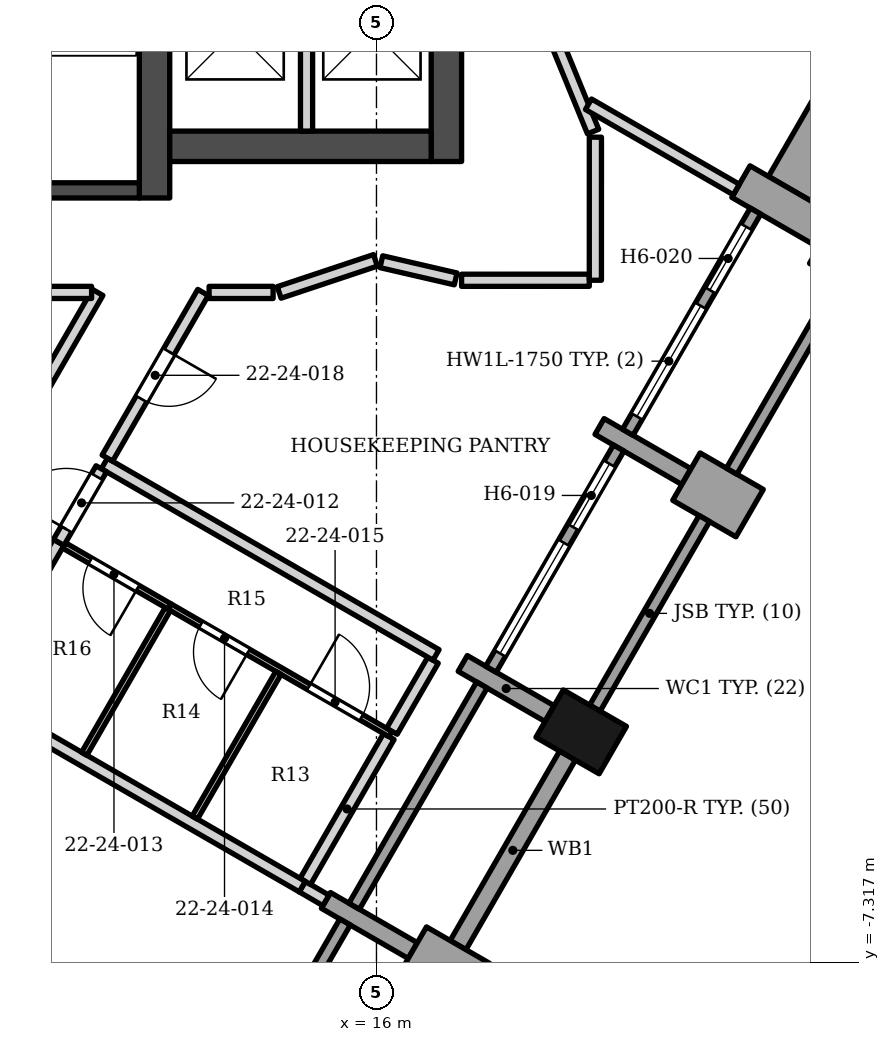
"""IFC4 building model, lengths in metres.
Left out: names, types, materials, properties, quantities, classifications, styles, units other than length and angle.
Written with IfcOpenShell. Run it as: python <this file> out.ifc"""

import sys

from ifc_helpers import new_model, si_unit, direction, frame, frame_2d, origin, origin_2d, place, context, subcontext, project, spatial, polyline, rectangle, outline, extrude, element, fill, save


model = new_model("IFC4")
c1 = context("Model", 3, precision=1e-05, world=origin(), true_north=direction((0.0, 1.0)))
c2 = subcontext(c1, "Body", "Model", "MODEL_VIEW")
j1 = project(units=[si_unit("LENGTHUNIT", "METRE"), si_unit("PLANEANGLEUNIT", "RADIAN")], contexts=[c1])
p1 = place(None, origin())
s1 = spatial("IfcSite", under=j1, at=p1, CompositionType="ELEMENT")
p2 = place(p1, origin())
s2 = spatial("IfcBuilding", under=s1, at=p2, CompositionType="ELEMENT")
p3 = place(p2, frame((0.0, 0.0, 102.0)))
s3 = spatial("IfcBuildingStorey", under=s2, at=p3, CompositionType="ELEMENT", Elevation=102.0)
p4 = place(p3, frame((12.35, 5.253, 0.0), z_axis=(0.0, 0.0, 1.0), x_axis=(0.0, 1.0, 0.0)))
e1 = element("IfcWall", 1, at=p4, inside=s3, PredefinedType="SHEAR", context=c2, shape_type="SweptSolid", body=[
    extrude(rectangle(XDim=13.3, YDim=0.5, at=frame_2d((6.65, 0.0))), origin(), (0.0, 0.0, 1.0), 3.4),
])
p5 = place(p3, frame((8.35, 5.378, 0.0), z_axis=(0.0, 0.0, 1.0), x_axis=(1.0, 0.0, 0.0)))
e2 = element("IfcWall", 2, at=p5, inside=s3, PredefinedType="SHEAR", context=c2, shape_type="SweptSolid", body=[
    extrude(rectangle(XDim=3.75, YDim=0.25, at=frame_2d((1.875, 0.0))), origin(), (0.0, 0.0, 1.0), 3.4),
])
p6 = place(p3, frame((12.6, 6.103, 0.0), z_axis=(0.0, 0.0, 1.0), x_axis=(1.0, 0.0, 0.0)))
e3 = element("IfcWall", 3, at=p6, inside=s3, PredefinedType="SHEAR", context=c2, shape_type="SweptSolid", body=[
    extrude(rectangle(XDim=4.3, YDim=0.5, at=frame_2d((2.15, 0.0))), origin(), (0.0, 0.0, 1.0), 3.4),
])
p7 = place(p3, frame((17.15, 5.853, 0.0), z_axis=(0.0, 0.0, 1.0), x_axis=(0.0, 1.0, 0.0)))
e4 = element("IfcWall", 4, at=p7, inside=s3, PredefinedType="SHEAR", context=c2, shape_type="SweptSolid", body=[
    extrude(rectangle(XDim=13.2, YDim=0.5, at=frame_2d((6.6, 0.0))), origin(), (0.0, 0.0, 1.0), 3.4),
])
p8 = place(p7, frame((4.1, 0.0, 0.0)))
e5 = element("IfcOpeningElement", 5, at=p8, cuts=e4, PredefinedType="OPENING", context=c2, shape_type="SweptSolid", body=[
    extrude(rectangle(XDim=1.6, YDim=2.1, at=frame_2d((0.8, 1.05))), frame((0.0, 0.26, 0.0), z_axis=(0.0, -1.0, 0.0), x_axis=(1.0, 0.0, 0.0)), (0.0, 0.0, 1.0), 0.52),
])
p9 = place(p7, frame((10.15, 0.0, 0.0)))
e6 = element("IfcOpeningElement", 6, at=p9, cuts=e4, PredefinedType="OPENING", context=c2, shape_type="SweptSolid", body=[
    extrude(rectangle(XDim=0.9, YDim=2.1, at=frame_2d((0.45, 1.05))), frame((0.0, 0.26, 0.0), z_axis=(0.0, -1.0, 0.0), x_axis=(1.0, 0.0, 0.0)), (0.0, 0.0, 1.0), 0.52),
])
for number, where, z_axis, x_axis in (
    (7, (19.367, -3.527, 0.0), (0.0, 0.0, 1.0), (0.5, 0.866, 0.0)),
    (8, (23.867, 4.267, 0.0), (0.0, 0.0, 1.0), (0.5, 0.866, 0.0)),
):
    element("IfcColumn", number, at=place(p3, frame(where, z_axis=z_axis, x_axis=x_axis)), inside=s3, PredefinedType="COLUMN", context=c2, shape_type="SweptSolid", body=[
        extrude(rectangle(XDim=0.9, YDim=1.2, at=origin_2d()), origin(), (0.0, 0.0, 1.0), 3.4),
    ])
p10 = place(p3, frame((17.637, -7.724, 0.0), z_axis=(0.0, 0.0, 1.0), x_axis=(-0.865955154139, 0.50012165622, 0.0)))
e9 = element("IfcWall", 9, at=p10, inside=s3, PredefinedType="SOLIDWALL", context=c2, shape_type="SweptSolid", body=[
    extrude(rectangle(XDim=1.2, YDim=0.9, at=frame_2d((0.6, 0.0))), origin(), (0.0, 0.0, 1.0), 2.63),
])
p11 = place(p3, frame((15.169, -6.299, 0.0), z_axis=(0.0, 0.0, 1.0), x_axis=(0.866040211805, -0.499974350878, 0.0)))
e10 = element("IfcWall", 10, at=p11, inside=s3, PredefinedType="SOLIDWALL", context=c2, shape_type="SweptSolid", body=[
    extrude(rectangle(XDim=1.65, YDim=0.3, at=frame_2d((0.825, 0.0))), origin(), (0.0, 0.0, 1.0), 2.65),
])
p12 = place(p3, frame((17.419, -2.402, 0.0), z_axis=(0.0, 0.0, 1.0), x_axis=(0.866003217194, -0.500038426333, 0.0)))
e11 = element("IfcWall", 11, at=p12, inside=s3, PredefinedType="SOLIDWALL", context=c2, shape_type="SweptSolid", body=[
    extrude(rectangle(XDim=1.65, YDim=0.3, at=frame_2d((0.825, 0.0))), origin(), (0.0, 0.0, 1.0), 2.65),
])
p13 = place(p3, frame((22.137, 0.07, 0.0), z_axis=(0.0, 0.0, 1.0), x_axis=(-0.865955154139, 0.50012165622, 0.0)))
e12 = element("IfcWall", 12, at=p13, inside=s3, PredefinedType="SOLIDWALL", context=c2, shape_type="SweptSolid", body=[
    extrude(rectangle(XDim=1.2, YDim=0.9, at=frame_2d((0.6, 0.0))), origin(), (0.0, 0.0, 1.0), 2.63),
])
p14 = place(p3, frame((21.098, 0.67, 0.0), z_axis=(0.0, 0.0, 1.0), x_axis=(-0.866040211805, 0.499974350878, 0.0)))
e13 = element("IfcWall", 13, at=p14, inside=s3, PredefinedType="SOLIDWALL", context=c2, shape_type="SweptSolid", body=[
    extrude(rectangle(XDim=1.65, YDim=0.3, at=frame_2d((0.825, 0.0))), origin(), (0.0, 0.0, 1.0), 2.65),
])
p15 = place(p3, frame((23.423, 4.697, 0.0), z_axis=(0.0, 0.0, 1.0), x_axis=(-0.865976140824, 0.500085316245, 0.0)))
e14 = element("IfcWall", 14, at=p15, inside=s3, PredefinedType="SOLIDWALL", context=c2, shape_type="SweptSolid", body=[
    extrude(rectangle(XDim=1.65, YDim=0.6, at=frame_2d((0.825, 0.0))), origin(), (0.0, 0.0, 1.0), 2.45),
])
p16 = place(p3, frame((13.383, -10.291, 0.0), z_axis=(0.0, 0.0, 1.0), x_axis=(0.500027713859, 0.866009402589, 0.0)))
e15 = element("IfcWall", 15, at=p16, inside=s3, PredefinedType="ELEMENTEDWALL", context=c2, shape_type="SweptSolid", body=[
    extrude(rectangle(XDim=4.2, YDim=0.2, at=frame_2d((2.1, 0.0))), origin(), (0.0, 0.0, 1.0), 2.384),
])
p17 = place(p3, frame((17.342, -7.034, 0.0), z_axis=(0.0, 0.0, 1.0), x_axis=(0.500012057535, 0.866018442252, 0.0)))
e16 = element("IfcWall", 16, at=p17, inside=s3, PredefinedType="SOLIDWALL", context=c2, shape_type="SweptSolid", body=[
    extrude(rectangle(XDim=3.6, YDim=0.3, at=frame_2d((1.8, 0.0))), origin(), (0.0, 0.0, 1.0), 2.63),
])
p18 = place(p3, frame((15.633, -6.394, 0.0), z_axis=(0.0, 0.0, 1.0), x_axis=(0.500002543286, 0.866023935413, 0.0)))
e17 = element("IfcWall", 17, at=p18, inside=s3, PredefinedType="ELEMENTEDWALL", context=c2, shape_type="SweptSolid", body=[
    extrude(rectangle(XDim=4.2, YDim=0.2, at=frame_2d((2.1, 0.0))), origin(), (0.0, 0.0, 1.0), 2.65),
])
p19 = place(p3, frame((19.592, -3.137, 0.0), z_axis=(0.0, 0.0, 1.0), x_axis=(0.500012057535, 0.866018442252, 0.0)))
e18 = element("IfcWall", 18, at=p19, inside=s3, PredefinedType="SOLIDWALL", context=c2, shape_type="SweptSolid", body=[
    extrude(rectangle(XDim=3.6, YDim=0.2, at=frame_2d((1.8, 0.0))), origin(), (0.0, 0.0, 1.0), 2.63),
])
p20 = place(p3, frame((17.883, -2.497, 0.0), z_axis=(0.0, 0.0, 1.0), x_axis=(0.500027713859, 0.866009402589, 0.0)))
e19 = element("IfcWall", 19, at=p20, inside=s3, PredefinedType="ELEMENTEDWALL", context=c2, shape_type="SweptSolid", body=[
    extrude(rectangle(XDim=4.2, YDim=0.2, at=frame_2d((2.1, 0.0))), origin(), (0.0, 0.0, 1.0), 2.65),
])
p21 = place(p20, frame((0.3, 0.0, 0.6)))
e20 = element("IfcOpeningElement", 20, at=p21, cuts=e19, PredefinedType="OPENING", context=c2, shape_type="SweptSolid", body=[
    extrude(rectangle(XDim=2.1, YDim=1.8, at=frame_2d((1.05, 0.9))), frame((0.0, 0.11, 0.0), z_axis=(0.0, -1.0, 0.0), x_axis=(1.0, 0.0, 0.0)), (0.0, 0.0, 1.0), 0.22),
])
p22 = place(p20, frame((2.7, 0.0, 0.0)))
e21 = element("IfcOpeningElement", 21, at=p22, cuts=e19, PredefinedType="OPENING", context=c2, shape_type="SweptSolid", body=[
    extrude(rectangle(XDim=1.2, YDim=2.4, at=frame_2d((0.6, 1.2))), frame((0.0, 0.11, 0.0), z_axis=(0.0, -1.0, 0.0), x_axis=(1.0, 0.0, 0.0)), (0.0, 0.0, 1.0), 0.22),
])
p23 = place(p3, frame((21.842, 0.76, 0.0), z_axis=(0.0, 0.0, 1.0), x_axis=(0.500012057535, 0.866018442252, 0.0)))
e22 = element("IfcWall", 22, at=p23, inside=s3, PredefinedType="SOLIDWALL", context=c2, shape_type="SweptSolid", body=[
    extrude(rectangle(XDim=3.6, YDim=0.2, at=frame_2d((1.8, 0.0))), origin(), (0.0, 0.0, 1.0), 2.63),
])
p24 = place(p3, frame((20.133, 1.4, 0.0), z_axis=(0.0, 0.0, 1.0), x_axis=(0.500002543286, 0.866023935413, 0.0)))
e23 = element("IfcWall", 23, at=p24, inside=s3, PredefinedType="ELEMENTEDWALL", context=c2, shape_type="SweptSolid", body=[
    extrude(rectangle(XDim=4.2, YDim=0.2, at=frame_2d((2.1, 0.0))), origin(), (0.0, 0.0, 1.0), 2.45),
])
p25 = place(p24, frame((0.3, 0.0, 0.6)))
e24 = element("IfcOpeningElement", 24, at=p25, cuts=e23, PredefinedType="OPENING", context=c2, shape_type="SweptSolid", body=[
    extrude(rectangle(XDim=2.1, YDim=1.75, at=frame_2d((1.05, 0.875))), frame((0.0, 0.11, 0.0), z_axis=(0.0, -1.0, 0.0), x_axis=(1.0, 0.0, 0.0)), (0.0, 0.0, 1.0), 0.22),
])
p26 = place(p24, frame((2.7, 0.0, 0.0)))
e25 = element("IfcOpeningElement", 25, at=p26, cuts=e23, PredefinedType="OPENING", context=c2, shape_type="SweptSolid", body=[
    extrude(rectangle(XDim=1.2, YDim=2.35, at=frame_2d((0.6, 1.175))), frame((0.0, 0.11, 0.0), z_axis=(0.0, -1.0, 0.0), x_axis=(1.0, 0.0, 0.0)), (0.0, 0.0, 1.0), 0.22),
])
p27 = place(p3, origin())
e26 = element("IfcWall", 26, at=p27, inside=s3, PredefinedType="SOLIDWALL", context=c2, shape_type="SweptSolid", body=[
    extrude(outline(polyline([(23.758, 7.878), (22.447, 5.607), (24.612, 4.357), (25.923, 6.628), (23.758, 7.878)])), origin(), (0.0, 0.0, 1.0), 2.552),
])
p28 = place(p3, frame((14.85, 6.353, 0.0), z_axis=(0.0, 0.0, 1.0), x_axis=(0.0, 1.0, 0.0)))
e27 = element("IfcWall", 27, at=p28, inside=s3, PredefinedType="SOLIDWALL", context=c2, shape_type="SweptSolid", body=[
    extrude(rectangle(XDim=2.5, YDim=0.2, at=frame_2d((1.25, 0.0))), origin(), (0.0, 0.0, 1.0), 3.23),
])
p29 = place(p3, frame((4.201, -8.791, 0.0), z_axis=(0.0, 0.0, 1.0), x_axis=(0.500109238176, 0.865962325907, 0.0)))
e28 = element("IfcWall", 28, at=p29, inside=s3, PredefinedType="PARTITIONING", context=c2, shape_type="SweptSolid", body=[
    extrude(rectangle(XDim=14.424, YDim=0.2, at=frame_2d((7.212, 0.0))), origin(), (0.0, 0.0, 1.0), 2.384),
])
p30 = place(p29, frame((7.839, 0.0, 0.0)))
e29 = element("IfcOpeningElement", 29, at=p30, cuts=e28, PredefinedType="OPENING", context=c2, shape_type="SweptSolid", body=[
    extrude(rectangle(XDim=1.6, YDim=2.1, at=frame_2d((0.8, 1.05))), frame((0.0, 0.11, 0.0), z_axis=(0.0, -1.0, 0.0), x_axis=(1.0, 0.0, 0.0)), (0.0, 0.0, 1.0), 0.22),
])
p31 = place(p29, frame((4.58, 0.0, 0.0)))
e30 = element("IfcOpeningElement", 30, at=p31, cuts=e28, PredefinedType="OPENING", context=c2, shape_type="SweptSolid", body=[
    extrude(rectangle(XDim=1.6, YDim=2.1, at=frame_2d((0.8, 1.05))), frame((0.0, 0.11, 0.0), z_axis=(0.0, -1.0, 0.0), x_axis=(1.0, 0.0, 0.0)), (0.0, 0.0, 1.0), 0.22),
])
p32 = place(p3, frame((14.78, -6.072, 0.0), z_axis=(0.0, 0.0, 1.0), x_axis=(0.864034851378, -0.503431997, 0.0)))
e31 = element("IfcWall", 31, at=p32, inside=s3, PredefinedType="PARTITIONING", context=c2, shape_type="SweptSolid", body=[
    extrude(rectangle(XDim=0.449, YDim=0.2, at=frame_2d((0.225, 0.0))), origin(), (0.0, 0.0, 1.0), 3.23),
])
p33 = place(p3, frame((14.829, -5.987, 0.0), z_axis=(0.0, 0.0, 1.0), x_axis=(0.499517615464, 0.866303729555, 0.0)))
e32 = element("IfcWall", 32, at=p33, inside=s3, PredefinedType="PARTITIONING", context=c2, shape_type="SweptSolid", body=[
    extrude(rectangle(XDim=2.752, YDim=0.2, at=frame_2d((1.376, 0.0))), origin(), (0.0, 0.0, 1.0), 3.23),
])
p34 = place(p3, frame((12.593, -1.463, 0.0), z_axis=(0.0, 0.0, 1.0), x_axis=(0.866022890907, -0.500004352405, 0.0)))
e33 = element("IfcWall", 33, at=p34, inside=s3, PredefinedType="PARTITIONING", context=c2, shape_type="SweptSolid", body=[
    extrude(rectangle(XDim=4.198, YDim=0.1, at=frame_2d((2.099, 0.0))), origin(), (0.0, 0.0, 1.0), 2.384),
])
p35 = place(p34, frame((0.598, 0.0, 0.0)))
e34 = element("IfcOpeningElement", 34, at=p35, cuts=e33, PredefinedType="OPENING", context=c2, shape_type="SweptSolid", body=[
    extrude(rectangle(XDim=0.9, YDim=2.1, at=frame_2d((0.45, 1.05))), frame((0.0, 0.06, 0.0), z_axis=(0.0, -1.0, 0.0), x_axis=(1.0, 0.0, 0.0)), (0.0, 0.0, 1.0), 0.12),
])
p36 = place(p34, frame((2.648, 0.0, 0.0)))
e35 = element("IfcOpeningElement", 35, at=p36, cuts=e33, PredefinedType="OPENING", context=c2, shape_type="SweptSolid", body=[
    extrude(rectangle(XDim=1.0, YDim=2.1, at=frame_2d((0.5, 1.05))), frame((0.0, 0.06, 0.0), z_axis=(0.0, -1.0, 0.0), x_axis=(1.0, 0.0, 0.0)), (0.0, 0.0, 1.0), 0.12),
])
p37 = place(p3, frame((16.253, -3.517, 0.0), z_axis=(0.0, 0.0, 1.0), x_axis=(0.500922210472, 0.865492310223, 0.0)))
e36 = element("IfcWall", 36, at=p37, inside=s3, PredefinedType="PARTITIONING", context=c2, shape_type="SweptSolid", body=[
    extrude(rectangle(XDim=1.35, YDim=0.2, at=frame_2d((0.675, 0.0))), origin(), (0.0, 0.0, 1.0), 3.23),
])
p38 = place(p3, frame((9.412, -2.973, 0.0), z_axis=(0.0, 0.0, 1.0), x_axis=(0.866009125512, -0.500028193735, 0.0)))
e37 = element("IfcWall", 37, at=p38, inside=s3, PredefinedType="PARTITIONING", context=c2, shape_type="SweptSolid", body=[
    extrude(rectangle(XDim=6.198, YDim=0.2, at=frame_2d((3.099, 0.0))), origin(), (0.0, 0.0, 1.0), 2.384),
])
p39 = place(p3, frame((13.012, -4.938, 0.0), z_axis=(0.0, 0.0, 1.0), x_axis=(0.499968400327, 0.866043647095, 0.0)))
e38 = element("IfcWall", 38, at=p39, inside=s3, PredefinedType="PARTITIONING", context=c2, shape_type="SweptSolid", body=[
    extrude(rectangle(XDim=2.75, YDim=0.1, at=frame_2d((1.375, 0.0))), origin(), (0.0, 0.0, 1.0), 2.384),
])
p40 = place(p3, frame((11.525, 0.886, 0.0), z_axis=(0.0, 0.0, 1.0), x_axis=(0.866148153111, -0.499787331635, 0.0)))
e39 = element("IfcWall", 39, at=p40, inside=s3, PredefinedType="PARTITIONING", context=c2, shape_type="SweptSolid", body=[
    extrude(rectangle(XDim=6.298, YDim=0.2, at=frame_2d((3.149, 0.0))), origin(), (0.0, 0.0, 1.0), 2.384),
])
p41 = place(p3, frame((11.193, -3.888, 0.0), z_axis=(0.0, 0.0, 1.0), x_axis=(0.499996545922, 0.866027397988, 0.0)))
e40 = element("IfcWall", 40, at=p41, inside=s3, PredefinedType="PARTITIONING", context=c2, shape_type="SweptSolid", body=[
    extrude(rectangle(XDim=2.75, YDim=0.1, at=frame_2d((1.375, 0.0))), origin(), (0.0, 0.0, 1.0), 3.23),
])
p42 = place(p3, frame((10.861, -0.461, 0.0), z_axis=(0.0, 0.0, 1.0), x_axis=(0.865624045709, -0.500694529119, 0.0)))
e41 = element("IfcWall", 41, at=p42, inside=s3, PredefinedType="PARTITIONING", context=c2, shape_type="SweptSolid", body=[
    extrude(rectangle(XDim=2.0, YDim=0.1, at=frame_2d((1.0, 0.0))), origin(), (0.0, 0.0, 1.0), 3.23),
])
p43 = place(p42, frame((0.5, 0.0, 0.0)))
e42 = element("IfcOpeningElement", 42, at=p43, cuts=e41, PredefinedType="OPENING", context=c2, shape_type="SweptSolid", body=[
    extrude(rectangle(XDim=0.9, YDim=2.1, at=frame_2d((0.45, 1.05))), frame((0.0, 0.06, 0.0), z_axis=(0.0, -1.0, 0.0), x_axis=(1.0, 0.0, 0.0)), (0.0, 0.0, 1.0), 0.12),
])
p44 = place(p3, frame((9.326, -2.923, 0.0), z_axis=(0.0, 0.0, 1.0), x_axis=(0.499435738433, 0.866350935347, 0.0)))
e43 = element("IfcWall", 43, at=p44, inside=s3, PredefinedType="PARTITIONING", context=c2, shape_type="SweptSolid", body=[
    extrude(rectangle(XDim=2.9, YDim=0.2, at=frame_2d((1.45, 0.0))), origin(), (0.0, 0.0, 1.0), 3.23),
])
p45 = place(p3, frame((10.774, -0.411, 0.0), z_axis=(0.0, 0.0, 1.0), x_axis=(0.500926145599, 0.865490032672, 0.0)))
e44 = element("IfcWall", 44, at=p45, inside=s3, PredefinedType="PARTITIONING", context=c2, shape_type="SweptSolid", body=[
    extrude(rectangle(XDim=1.398, YDim=0.2, at=frame_2d((0.699, 0.0))), origin(), (0.0, 0.0, 1.0), 3.23),
])
p46 = place(p45, frame((0.25, 0.0, 0.0)))
e45 = element("IfcOpeningElement", 45, at=p46, cuts=e44, PredefinedType="OPENING", context=c2, shape_type="SweptSolid", body=[
    extrude(rectangle(XDim=1.0, YDim=2.1, at=frame_2d((0.5, 1.05))), frame((0.0, 0.11, 0.0), z_axis=(0.0, -1.0, 0.0), x_axis=(1.0, 0.0, 0.0)), (0.0, 0.0, 1.0), 0.22),
])
p47 = place(p3, frame((11.574, 0.975, 0.0), z_axis=(0.0, 0.0, 1.0), x_axis=(0.500078475469, 0.86598009121, 0.0)))
e46 = element("IfcWall", 46, at=p47, inside=s3, PredefinedType="PARTITIONING", context=c2, shape_type="SweptSolid", body=[
    extrude(rectangle(XDim=3.146, YDim=0.2, at=frame_2d((1.573, 0.0))), origin(), (0.0, 0.0, 1.0), 3.23),
])
p48 = place(p47, frame((1.122, 0.0, 0.0)))
e47 = element("IfcOpeningElement", 47, at=p48, cuts=e46, PredefinedType="OPENING", context=c2, shape_type="SweptSolid", body=[
    extrude(rectangle(XDim=0.9, YDim=2.1, at=frame_2d((0.45, 1.05))), frame((0.0, 0.11, 0.0), z_axis=(0.0, -1.0, 0.0), x_axis=(1.0, 0.0, 0.0)), (0.0, 0.0, 1.0), 0.22),
])
p49 = place(p3, frame((6.0, 3.7, 0.0), z_axis=(0.0, 0.0, 1.0), x_axis=(1.0, 0.0, 0.0)))
e48 = element("IfcWall", 48, at=p49, inside=s3, PredefinedType="PARTITIONING", context=c2, shape_type="SweptSolid", body=[
    extrude(rectangle(XDim=5.315, YDim=0.2, at=frame_2d((2.657, 0.0))), origin(), (0.0, 0.0, 1.0), 2.832),
])
p50 = place(p3, frame((13.248, 3.699, 0.0), z_axis=(0.0, 0.0, 1.0), x_axis=(1.0, 0.0, 0.0)))
e49 = element("IfcWall", 49, at=p50, inside=s3, PredefinedType="PARTITIONING", context=c2, shape_type="SweptSolid", body=[
    extrude(rectangle(XDim=1.052, YDim=0.2, at=frame_2d((0.526, 0.0))), origin(), (0.0, 0.0, 1.0), 2.384),
])
p51 = place(p3, frame((14.4, 3.699, 0.0), z_axis=(0.0, 0.0, 1.0), x_axis=(0.948683298051, 0.316227766017, 0.0)))
e50 = element("IfcWall", 50, at=p51, inside=s3, PredefinedType="PARTITIONING", context=c2, shape_type="SweptSolid", body=[
    extrude(rectangle(XDim=1.668, YDim=0.2, at=frame_2d((0.834, 0.0))), origin(), (0.0, 0.0, 1.0), 3.23),
])
p52 = place(p3, frame((17.4, 3.899, 0.0), z_axis=(0.0, 0.0, 1.0), x_axis=(0.999999993243, 0.000116252034, 0.0)))
e51 = element("IfcWall", 51, at=p52, inside=s3, PredefinedType="PARTITIONING", context=c2, shape_type="SweptSolid", body=[
    extrude(rectangle(XDim=2.1, YDim=0.2, at=frame_2d((1.05, 0.0))), origin(), (0.0, 0.0, 1.0), 3.23),
])
p53 = place(p3, frame((19.6, 3.9, 0.0), z_axis=(0.0, 0.0, 1.0), x_axis=(0.000207511927, 0.999999978469, 0.0)))
e52 = element("IfcWall", 52, at=p53, inside=s3, PredefinedType="PARTITIONING", context=c2, shape_type="SweptSolid", body=[
    extrude(rectangle(XDim=2.353, YDim=0.2, at=frame_2d((1.177, 0.0))), origin(), (0.0, 0.0, 1.0), 2.45),
])
p54 = place(p3, frame((16.08, 4.205, 0.0), z_axis=(0.0, 0.0, 1.0), x_axis=(0.974315694548, -0.225186428005, 0.0)))
e53 = element("IfcWall", 53, at=p54, inside=s3, PredefinedType="PARTITIONING", context=c2, shape_type="SweptSolid", body=[
    extrude(rectangle(XDim=1.254, YDim=0.2, at=frame_2d((0.627, 0.0))), origin(), (0.0, 0.0, 1.0), 3.23),
])
p55 = place(p3, frame((18.904, 7.954, 0.0), z_axis=(0.0, 0.0, 1.0), x_axis=(0.378643783121, -0.925542481739, 0.0)))
e54 = element("IfcWall", 54, at=p55, inside=s3, PredefinedType="PARTITIONING", context=c2, shape_type="SweptSolid", body=[
    extrude(rectangle(XDim=1.738, YDim=0.2, at=frame_2d((0.869, 0.0))), origin(), (0.0, 0.0, 1.0), 3.23),
])
p56 = place(p3, frame((19.487, 6.794, 0.0), z_axis=(0.0, 0.0, 1.0), x_axis=(0.866320237392, -0.499488985149, 0.0)))
e55 = element("IfcWall", 55, at=p56, inside=s3, PredefinedType="PARTITIONING", context=c2, shape_type="SweptSolid", body=[
    extrude(rectangle(XDim=2.807, YDim=0.2, at=frame_2d((1.403, 0.0))), origin(), (0.0, 0.0, 1.0), 3.23),
])
p57 = place(p21, origin())
e56 = element("IfcWindow", 56, at=p57, inside=s3, PartitioningType="SINGLE_PANEL", PredefinedType="WINDOW", context=c2, shape_type="SweptSolid", body=[
    extrude(rectangle(XDim=2.1, YDim=1.8, at=frame_2d((1.05, 0.9))), frame((0.0, 0.03, 0.0), z_axis=(0.0, -1.0, 0.0), x_axis=(1.0, 0.0, 0.0)), (0.0, 0.0, 1.0), 0.06),
])
fill(e20, e56)
p58 = place(p22, origin())
e57 = element("IfcDoor", 57, at=p58, inside=s3, OperationType="SINGLE_SWING_LEFT", PredefinedType="DOOR", context=c2, shape_type="SweptSolid", body=[
    extrude(rectangle(XDim=1.2, YDim=2.4, at=frame_2d((0.6, 1.2))), frame((0.0, 0.025, 0.0), z_axis=(0.0, -1.0, 0.0), x_axis=(1.0, 0.0, 0.0)), (0.0, 0.0, 1.0), 0.05),
])
fill(e21, e57)
p59 = place(p25, origin())
e58 = element("IfcWindow", 58, at=p59, inside=s3, PartitioningType="SINGLE_PANEL", PredefinedType="WINDOW", context=c2, shape_type="SweptSolid", body=[
    extrude(rectangle(XDim=2.1, YDim=1.75, at=frame_2d((1.05, 0.875))), frame((0.0, 0.03, 0.0), z_axis=(0.0, -1.0, 0.0), x_axis=(1.0, 0.0, 0.0)), (0.0, 0.0, 1.0), 0.06),
])
fill(e24, e58)
p60 = place(p26, origin())
e59 = element("IfcDoor", 59, at=p60, inside=s3, OperationType="SINGLE_SWING_LEFT", PredefinedType="DOOR", context=c2, shape_type="SweptSolid", body=[
    extrude(rectangle(XDim=1.2, YDim=2.35, at=frame_2d((0.6, 1.175))), frame((0.0, 0.025, 0.0), z_axis=(0.0, -1.0, 0.0), x_axis=(1.0, 0.0, 0.0)), (0.0, 0.0, 1.0), 0.05),
])
fill(e25, e59)
p61 = place(p46, origin())
e60 = element("IfcDoor", 60, at=p61, inside=s3, OperationType="SINGLE_SWING_LEFT", PredefinedType="DOOR", context=c2, shape_type="SweptSolid", body=[
    extrude(rectangle(XDim=1.0, YDim=2.1, at=frame_2d((0.5, 1.05))), frame((0.0, 0.025, 0.0), z_axis=(0.0, -1.0, 0.0), x_axis=(1.0, 0.0, 0.0)), (0.0, 0.0, 1.0), 0.05),
])
fill(e45, e60)
p62 = place(p43, origin())
e61 = element("IfcDoor", 61, at=p62, inside=s3, OperationType="SINGLE_SWING_RIGHT", PredefinedType="DOOR", context=c2, shape_type="SweptSolid", body=[
    extrude(rectangle(XDim=0.9, YDim=2.1, at=frame_2d((0.45, 1.05))), frame((0.0, 0.025, 0.0), z_axis=(0.0, -1.0, 0.0), x_axis=(1.0, 0.0, 0.0)), (0.0, 0.0, 1.0), 0.05),
])
fill(e42, e61)
p63 = place(p35, origin())
e62 = element("IfcDoor", 62, at=p63, inside=s3, OperationType="SINGLE_SWING_RIGHT", PredefinedType="DOOR", context=c2, shape_type="SweptSolid", body=[
    extrude(rectangle(XDim=0.9, YDim=2.1, at=frame_2d((0.45, 1.05))), frame((0.0, 0.025, 0.0), z_axis=(0.0, -1.0, 0.0), x_axis=(1.0, 0.0, 0.0)), (0.0, 0.0, 1.0), 0.05),
])
fill(e34, e62)
p64 = place(p36, origin())
e63 = element("IfcDoor", 63, at=p64, inside=s3, OperationType="SINGLE_SWING_LEFT", PredefinedType="DOOR", context=c2, shape_type="SweptSolid", body=[
    extrude(rectangle(XDim=1.0, YDim=2.1, at=frame_2d((0.5, 1.05))), frame((0.0, 0.025, 0.0), z_axis=(0.0, -1.0, 0.0), x_axis=(1.0, 0.0, 0.0)), (0.0, 0.0, 1.0), 0.05),
])
fill(e35, e63)
p65 = place(p48, origin())
e64 = element("IfcDoor", 64, at=p65, inside=s3, OperationType="SINGLE_SWING_RIGHT", PredefinedType="DOOR", context=c2, shape_type="SweptSolid", body=[
    extrude(rectangle(XDim=0.9, YDim=2.1, at=frame_2d((0.45, 1.05))), frame((0.0, 0.025, 0.0), z_axis=(0.0, -1.0, 0.0), x_axis=(1.0, 0.0, 0.0)), (0.0, 0.0, 1.0), 0.05),
])
fill(e47, e64)
save(model, sys.argv[1])
